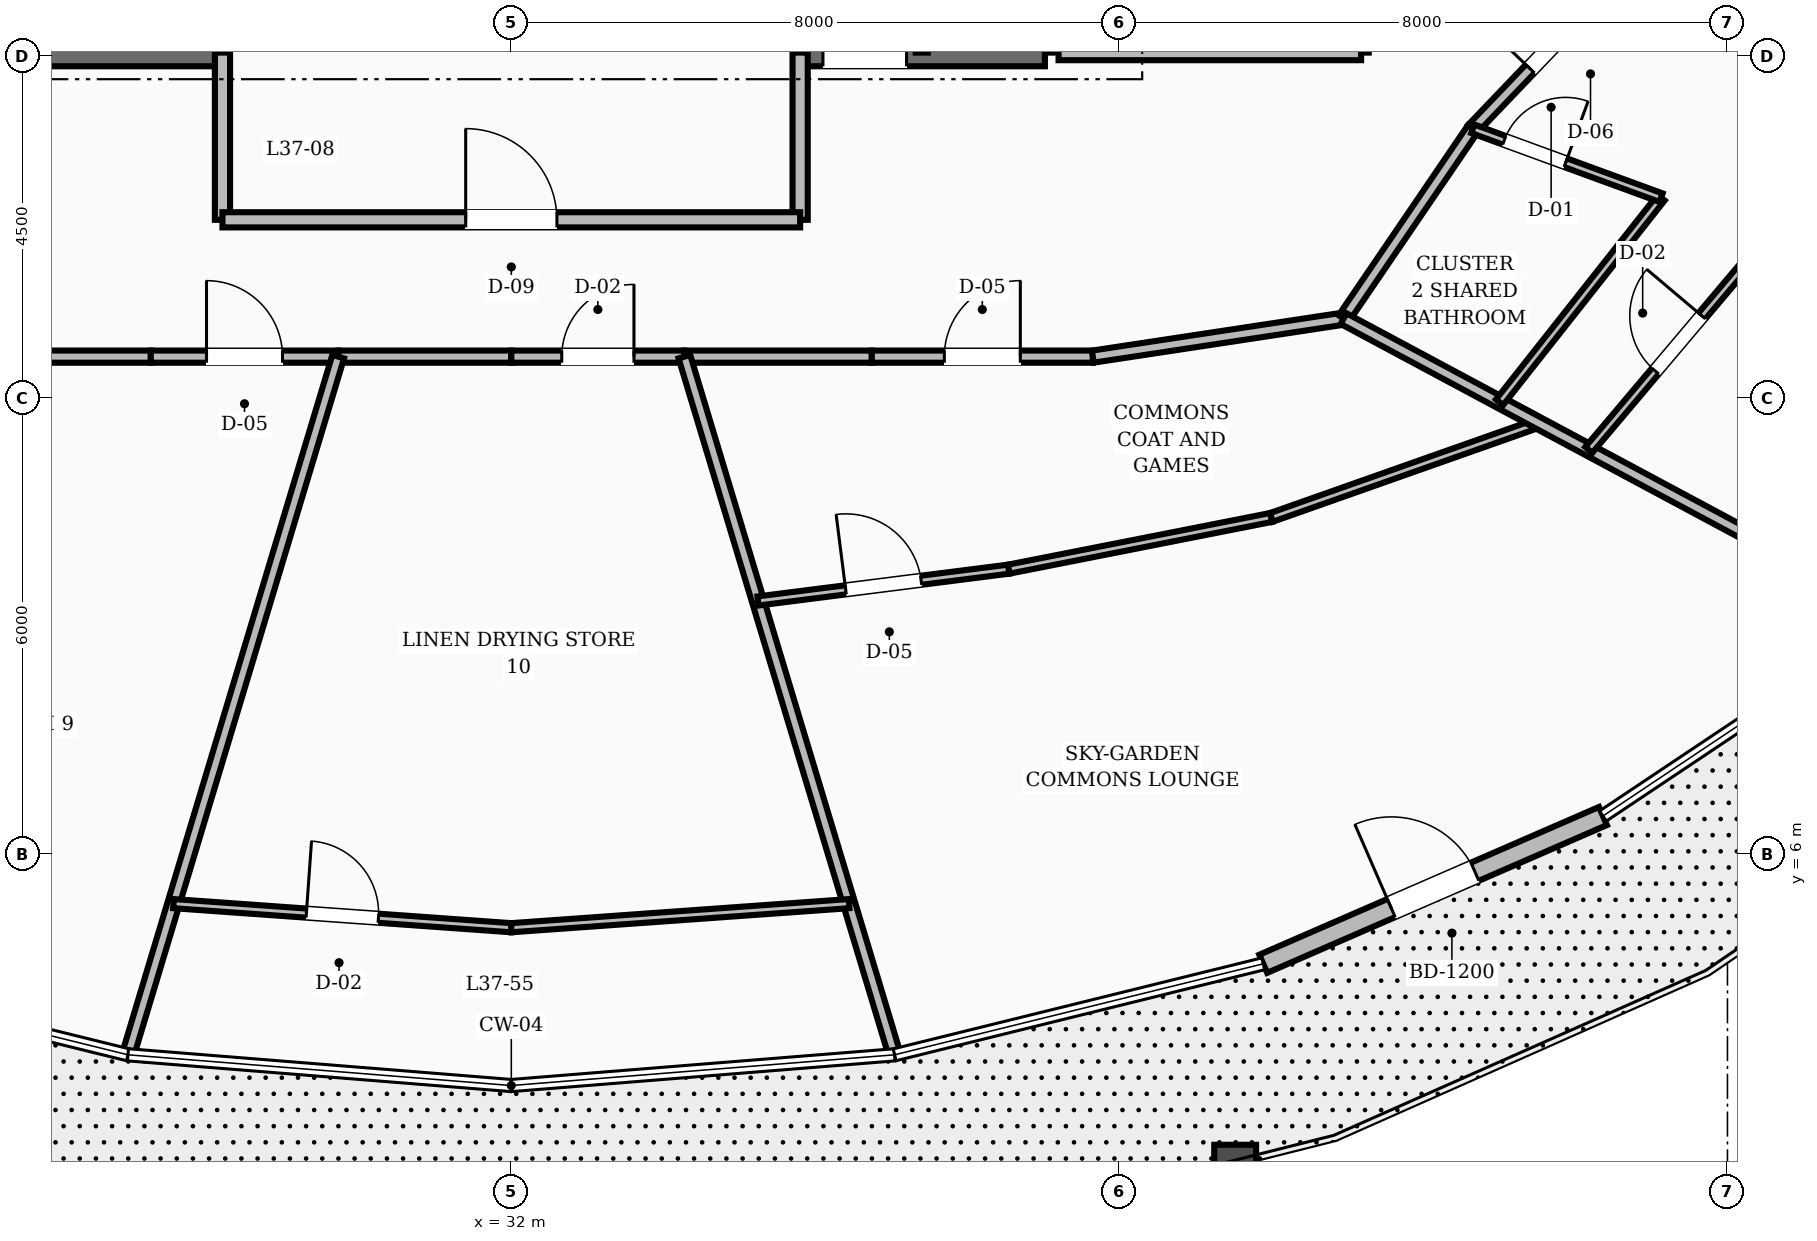
"""IFC4 building model, lengths in metres.
Left out: names, types, materials, properties, quantities, classifications, styles, units other than length and angle.
Written with IfcOpenShell. Run it as: python <this file> out.ifc"""

import sys

from ifc_helpers import new_model, si_unit, direction, frame, frame_2d, origin, place, context, subcontext, project, spatial, rectangle, extrude, element, fill, save


model = new_model("IFC4")
c1 = context("Model", 3, precision=1e-05, world=origin(), true_north=direction((0.0, 1.0)))
c2 = subcontext(c1, "Body", "Model", "MODEL_VIEW")
j1 = project(units=[si_unit("LENGTHUNIT", "METRE"), si_unit("PLANEANGLEUNIT", "RADIAN")], contexts=[c1])
p1 = place(None, origin())
s1 = spatial("IfcSite", under=j1, at=p1, CompositionType="ELEMENT")
p2 = place(p1, origin())
s2 = spatial("IfcBuilding", under=s1, at=p2, CompositionType="ELEMENT")
p3 = place(p2, frame((0.0, 0.0, 146.0)))
s3 = spatial("IfcBuildingStorey", under=s2, at=p3, CompositionType="ELEMENT", Elevation=146.0)
p4 = place(p3, frame((24.98, 16.55, 0.0), z_axis=(0.0, 0.0, 1.0), x_axis=(1.0, 0.0, 0.0)))
e1 = element("IfcWall", 1, at=p4, inside=s3, PredefinedType="SHEAR", context=c2, shape_type="SweptSolid", body=[
    extrude(rectangle(XDim=3.22, YDim=0.36, at=frame_2d((1.61, 0.0))), origin(), (0.0, 0.0, 1.0), 3.6),
])
p5 = place(p3, frame((35.8, 16.55, 0.0), z_axis=(0.0, 0.0, 1.0), x_axis=(1.0, 0.0, 0.0)))
e2 = element("IfcWall", 2, at=p5, inside=s3, PredefinedType="SHEAR", context=c2, shape_type="SweptSolid", body=[
    extrude(rectangle(XDim=3.22, YDim=0.36, at=frame_2d((1.61, 0.0))), origin(), (0.0, 0.0, 1.0), 3.6),
])
p6 = place(p5, frame((0.3, 0.0, 0.0)))
e3 = element("IfcOpeningElement", 3, at=p6, cuts=e2, PredefinedType="OPENING", context=c2, shape_type="SweptSolid", body=[
    extrude(rectangle(XDim=1.1, YDim=2.1, at=frame_2d((0.55, 1.05))), frame((0.0, 0.19, 0.0), z_axis=(0.0, -1.0, 0.0), x_axis=(1.0, 0.0, 0.0)), (0.0, 0.0, 1.0), 0.38),
])
p7 = place(p3, frame((41.893, 4.562, 0.0), z_axis=(0.0, 0.0, 1.0), x_axis=(0.916980839608, 0.398931246948, 0.0)))
e4 = element("IfcWall", 4, at=p7, inside=s3, PredefinedType="STANDARD", context=c2, shape_type="SweptSolid", body=[
    extrude(rectangle(XDim=4.874, YDim=0.26, at=frame_2d((2.437, 0.0))), origin(), (0.0, 0.0, 1.0), 2.82),
])
p8 = place(p7, frame((1.837, 0.0, 0.0)))
e5 = element("IfcOpeningElement", 5, at=p8, cuts=e4, PredefinedType="OPENING", context=c2, shape_type="SweptSolid", body=[
    extrude(rectangle(XDim=1.2, YDim=2.15, at=frame_2d((0.6, 1.075))), frame((0.0, 0.14, 0.0), z_axis=(0.0, -1.0, 0.0), x_axis=(1.0, 0.0, 0.0)), (0.0, 0.0, 1.0), 0.28),
])
p9 = place(p3, frame((39.2, 16.55, 0.0), z_axis=(0.0, 0.0, 1.0), x_axis=(1.0, 0.0, 0.0)))
e6 = element("IfcWall", 6, at=p9, inside=s3, PredefinedType="SOLIDWALL", context=c2, shape_type="SweptSolid", body=[
    extrude(rectangle(XDim=3.98, YDim=0.2, at=frame_2d((1.99, 0.0))), origin(), (0.0, 0.0, 1.0), 2.8),
])
for number, where, z_axis, x_axis in (
    (7, (28.2, 14.35, 0.0), (0.0, 0.0, 1.0), (0.0, 1.0, 0.0)),
    (8, (35.8, 14.35, 0.0), (0.0, 0.0, 1.0), (0.0, 1.0, 0.0)),
):
    element("IfcWall", number, at=place(p3, frame(where, z_axis=z_axis, x_axis=x_axis)), inside=s3, PredefinedType="SOLIDWALL", context=c2, shape_type="SweptSolid", body=[
        extrude(rectangle(XDim=2.2, YDim=0.2, at=frame_2d((1.1, 0.0))), origin(), (0.0, 0.0, 1.0), 2.8),
    ])
p10 = place(p3, frame((28.2, 14.35, 0.0), z_axis=(0.0, 0.0, 1.0), x_axis=(1.0, 0.0, 0.0)))
e9 = element("IfcWall", 9, at=p10, inside=s3, PredefinedType="SOLIDWALL", context=c2, shape_type="SweptSolid", body=[
    extrude(rectangle(XDim=7.6, YDim=0.2, at=frame_2d((3.8, 0.0))), origin(), (0.0, 0.0, 1.0), 2.8),
])
p11 = place(p10, frame((3.2, 0.0, 0.0)))
e10 = element("IfcOpeningElement", 10, at=p11, cuts=e9, PredefinedType="OPENING", context=c2, shape_type="SweptSolid", body=[
    extrude(rectangle(XDim=1.2, YDim=2.1, at=frame_2d((0.6, 1.05))), frame((0.0, 0.11, 0.0), z_axis=(0.0, -1.0, 0.0), x_axis=(1.0, 0.0, 0.0)), (0.0, 0.0, 1.0), 0.22),
])
p12 = place(p3, frame((24.349, 12.55, 0.0), z_axis=(0.0, 0.0, 1.0), x_axis=(1.0, 0.0, 0.0)))
e11 = element("IfcWall", 11, at=p12, inside=s3, PredefinedType="SOLIDWALL", context=c2, shape_type="SweptSolid", body=[
    extrude(rectangle(XDim=2.908, YDim=0.16, at=frame_2d((1.454, 0.0))), origin(), (0.0, 0.0, 1.0), 2.8),
])
p13 = place(p3, frame((27.257, 12.55, 0.0), z_axis=(0.0, 0.0, 1.0), x_axis=(1.0, 0.0, 0.0)))
e12 = element("IfcWall", 12, at=p13, inside=s3, PredefinedType="SOLIDWALL", context=c2, shape_type="SweptSolid", body=[
    extrude(rectangle(XDim=2.465, YDim=0.16, at=frame_2d((1.232, 0.0))), origin(), (0.0, 0.0, 1.0), 2.8),
])
p14 = place(p13, frame((0.733, 0.0, 0.0)))
e13 = element("IfcOpeningElement", 13, at=p14, cuts=e12, PredefinedType="OPENING", context=c2, shape_type="SweptSolid", body=[
    extrude(rectangle(XDim=1.0, YDim=2.1, at=frame_2d((0.5, 1.05))), frame((0.0, 0.09, 0.0), z_axis=(0.0, -1.0, 0.0), x_axis=(1.0, 0.0, 0.0)), (0.0, 0.0, 1.0), 0.18),
])
p15 = place(p3, frame((29.722, 12.55, 0.0), z_axis=(0.0, 0.0, 1.0), x_axis=(1.0, 0.0, 0.0)))
e14 = element("IfcWall", 14, at=p15, inside=s3, PredefinedType="SOLIDWALL", context=c2, shape_type="SweptSolid", body=[
    extrude(rectangle(XDim=2.278, YDim=0.16, at=frame_2d((1.139, 0.0))), origin(), (0.0, 0.0, 1.0), 2.8),
])
p16 = place(p3, frame((32.0, 12.55, 0.0), z_axis=(0.0, 0.0, 1.0), x_axis=(1.0, 0.0, 0.0)))
e15 = element("IfcWall", 15, at=p16, inside=s3, PredefinedType="SOLIDWALL", context=c2, shape_type="SweptSolid", body=[
    extrude(rectangle(XDim=2.278, YDim=0.16, at=frame_2d((1.139, 0.0))), origin(), (0.0, 0.0, 1.0), 2.8),
])
p17 = place(p16, frame((0.664, 0.0, 0.0)))
e16 = element("IfcOpeningElement", 16, at=p17, cuts=e15, PredefinedType="OPENING", context=c2, shape_type="SweptSolid", body=[
    extrude(rectangle(XDim=0.95, YDim=2.1, at=frame_2d((0.475, 1.05))), frame((0.0, 0.09, 0.0), z_axis=(0.0, -1.0, 0.0), x_axis=(1.0, 0.0, 0.0)), (0.0, 0.0, 1.0), 0.18),
])
p18 = place(p3, frame((34.278, 12.55, 0.0), z_axis=(0.0, 0.0, 1.0), x_axis=(1.0, 0.0, 0.0)))
e17 = element("IfcWall", 17, at=p18, inside=s3, PredefinedType="SOLIDWALL", context=c2, shape_type="SweptSolid", body=[
    extrude(rectangle(XDim=2.465, YDim=0.16, at=frame_2d((1.232, 0.0))), origin(), (0.0, 0.0, 1.0), 2.8),
])
p19 = place(p3, frame((36.743, 12.55, 0.0), z_axis=(0.0, 0.0, 1.0), x_axis=(1.0, 0.0, 0.0)))
e18 = element("IfcWall", 18, at=p19, inside=s3, PredefinedType="SOLIDWALL", context=c2, shape_type="SweptSolid", body=[
    extrude(rectangle(XDim=2.908, YDim=0.16, at=frame_2d((1.454, 0.0))), origin(), (0.0, 0.0, 1.0), 2.8),
])
p20 = place(p19, frame((0.954, 0.0, 0.0)))
e19 = element("IfcOpeningElement", 19, at=p20, cuts=e18, PredefinedType="OPENING", context=c2, shape_type="SweptSolid", body=[
    extrude(rectangle(XDim=1.0, YDim=2.1, at=frame_2d((0.5, 1.05))), frame((0.0, 0.09, 0.0), z_axis=(0.0, -1.0, 0.0), x_axis=(1.0, 0.0, 0.0)), (0.0, 0.0, 1.0), 0.18),
])
p21 = place(p3, frame((39.651, 12.55, 0.0), z_axis=(0.0, 0.0, 1.0), x_axis=(0.988710906508, 0.149835721217, 0.0)))
e20 = element("IfcWall", 20, at=p21, inside=s3, PredefinedType="SOLIDWALL", context=c2, shape_type="SweptSolid", body=[
    extrude(rectangle(XDim=3.337, YDim=0.16, at=frame_2d((1.668, 0.0))), origin(), (0.0, 0.0, 1.0), 2.8),
])
p22 = place(p3, frame((42.95, 13.05, 0.0), z_axis=(0.0, 0.0, 1.0), x_axis=(0.562674669208, 0.826678423955, 0.0)))
e21 = element("IfcWall", 21, at=p22, inside=s3, PredefinedType="SOLIDWALL", context=c2, shape_type="SweptSolid", body=[
    extrude(rectangle(XDim=3.021, YDim=0.16, at=frame_2d((1.511, 0.0))), origin(), (0.0, 0.0, 1.0), 2.8),
])
p23 = place(p3, frame((44.65, 15.548, 0.0), z_axis=(0.0, 0.0, 1.0), x_axis=(0.691055487108, 0.722801711216, 0.0)))
e22 = element("IfcWall", 22, at=p23, inside=s3, PredefinedType="SOLIDWALL", context=c2, shape_type="SweptSolid", body=[
    extrude(rectangle(XDim=3.184, YDim=0.16, at=frame_2d((1.592, 0.0))), origin(), (0.0, 0.0, 1.0), 2.8),
])
p24 = place(p23, frame((1.092, 0.0, 0.0)))
e23 = element("IfcOpeningElement", 23, at=p24, cuts=e22, PredefinedType="OPENING", context=c2, shape_type="SweptSolid", body=[
    extrude(rectangle(XDim=1.0, YDim=2.1, at=frame_2d((0.5, 1.05))), frame((0.0, 0.09, 0.0), z_axis=(0.0, -1.0, 0.0), x_axis=(1.0, 0.0, 0.0)), (0.0, 0.0, 1.0), 0.18),
])
p25 = place(p3, frame((34.278, 12.55, 0.0), z_axis=(0.0, 0.0, 1.0), x_axis=(0.28831479655, -0.9575356798, 0.0)))
e24 = element("IfcWall", 24, at=p25, inside=s3, PredefinedType="SOLIDWALL", context=c2, shape_type="SweptSolid", body=[
    extrude(rectangle(XDim=9.542, YDim=0.16, at=frame_2d((4.771, 0.0))), origin(), (0.0, 0.0, 1.0), 2.8),
])
p26 = place(p3, frame((35.246, 9.335, 0.0), z_axis=(0.0, 0.0, 1.0), x_axis=(0.992026301768, 0.126031014438, 0.0)))
e25 = element("IfcWall", 25, at=p26, inside=s3, PredefinedType="PARTITIONING", context=c2, shape_type="SweptSolid", body=[
    extrude(rectangle(XDim=3.326, YDim=0.12, at=frame_2d((1.663, 0.0))), origin(), (0.0, 0.0, 1.0), 2.8),
])
p27 = place(p26, frame((1.163, 0.0, 0.0)))
e26 = element("IfcOpeningElement", 26, at=p27, cuts=e25, PredefinedType="OPENING", context=c2, shape_type="SweptSolid", body=[
    extrude(rectangle(XDim=1.0, YDim=2.1, at=frame_2d((0.5, 1.05))), frame((0.0, 0.07, 0.0), z_axis=(0.0, -1.0, 0.0), x_axis=(1.0, 0.0, 0.0)), (0.0, 0.0, 1.0), 0.14),
])
p28 = place(p3, frame((38.545, 9.754, 0.0), z_axis=(0.0, 0.0, 1.0), x_axis=(0.981147276933, 0.193261535148, 0.0)))
e27 = element("IfcWall", 27, at=p28, inside=s3, PredefinedType="PARTITIONING", context=c2, shape_type="SweptSolid", body=[
    extrude(rectangle(XDim=3.521, YDim=0.12, at=frame_2d((1.76, 0.0))), origin(), (0.0, 0.0, 1.0), 2.8),
])
p29 = place(p3, frame((42.0, 10.435, 0.0), z_axis=(0.0, 0.0, 1.0), x_axis=(0.942997587187, 0.332799565145, 0.0)))
e28 = element("IfcWall", 28, at=p29, inside=s3, PredefinedType="PARTITIONING", context=c2, shape_type="SweptSolid", body=[
    extrude(rectangle(XDim=3.728, YDim=0.12, at=frame_2d((1.864, 0.0))), origin(), (0.0, 0.0, 1.0), 2.8),
])
p30 = place(p3, frame((42.95, 13.05, 0.0), z_axis=(0.0, 0.0, 1.0), x_axis=(0.881439566777, -0.472296824169, 0.0)))
e29 = element("IfcWall", 29, at=p30, inside=s3, PredefinedType="SOLIDWALL", context=c2, shape_type="SweptSolid", body=[
    extrude(rectangle(XDim=8.265, YDim=0.16, at=frame_2d((4.133, 0.0))), origin(), (0.0, 0.0, 1.0), 2.8),
])
p31 = place(p3, frame((45.002, 11.95, 0.0), z_axis=(0.0, 0.0, 1.0), x_axis=(0.619575015098, 0.784937450162, 0.0)))
e30 = element("IfcWall", 30, at=p31, inside=s3, PredefinedType="PARTITIONING", context=c2, shape_type="SweptSolid", body=[
    extrude(rectangle(XDim=3.428, YDim=0.12, at=frame_2d((1.714, 0.0))), origin(), (0.0, 0.0, 1.0), 2.8),
])
p32 = place(p3, frame((44.65, 15.548, 0.0), z_axis=(0.0, 0.0, 1.0), x_axis=(0.93908860173, -0.343675134538, 0.0)))
e31 = element("IfcWall", 31, at=p32, inside=s3, PredefinedType="PARTITIONING", context=c2, shape_type="SweptSolid", body=[
    extrude(rectangle(XDim=2.637, YDim=0.12, at=frame_2d((1.318, 0.0))), origin(), (0.0, 0.0, 1.0), 2.8),
])
p33 = place(p32, frame((0.44, 0.0, 0.0)))
e32 = element("IfcOpeningElement", 32, at=p33, cuts=e31, PredefinedType="OPENING", context=c2, shape_type="SweptSolid", body=[
    extrude(rectangle(XDim=0.86, YDim=2.1, at=frame_2d((0.43, 1.05))), frame((0.0, 0.07, 0.0), z_axis=(0.0, -1.0, 0.0), x_axis=(1.0, 0.0, 0.0)), (0.0, 0.0, 1.0), 0.14),
])
p34 = place(p3, frame((46.175, 11.322, 0.0), z_axis=(0.0, 0.0, 1.0), x_axis=(0.645297395585, 0.763931457169, 0.0)))
e33 = element("IfcWall", 33, at=p34, inside=s3, PredefinedType="PARTITIONING", context=c2, shape_type="SweptSolid", body=[
    extrude(rectangle(XDim=3.667, YDim=0.12, at=frame_2d((1.833, 0.0))), origin(), (0.0, 0.0, 1.0), 2.8),
])
p35 = place(p34, frame((1.359, 0.0, 0.0)))
e34 = element("IfcOpeningElement", 34, at=p35, cuts=e33, PredefinedType="OPENING", context=c2, shape_type="SweptSolid", body=[
    extrude(rectangle(XDim=0.95, YDim=2.1, at=frame_2d((0.475, 1.05))), frame((0.0, 0.07, 0.0), z_axis=(0.0, -1.0, 0.0), x_axis=(1.0, 0.0, 0.0)), (0.0, 0.0, 1.0), 0.14),
])
p36 = place(p3, frame((29.722, 12.55, 0.0), z_axis=(0.0, 0.0, 1.0), x_axis=(-0.28831479655, -0.9575356798, 0.0)))
e35 = element("IfcWall", 35, at=p36, inside=s3, PredefinedType="SOLIDWALL", context=c2, shape_type="SweptSolid", body=[
    extrude(rectangle(XDim=9.542, YDim=0.16, at=frame_2d((4.771, 0.0))), origin(), (0.0, 0.0, 1.0), 2.8),
])
p37 = place(p3, frame((27.556, 5.354, 0.0), z_axis=(0.0, 0.0, 1.0), x_axis=(0.997467592574, -0.071122442055, 0.0)))
e36 = element("IfcWall", 36, at=p37, inside=s3, PredefinedType="PARTITIONING", context=c2, shape_type="SweptSolid", body=[
    extrude(rectangle(XDim=4.456, YDim=0.12, at=frame_2d((2.228, 0.0))), origin(), (0.0, 0.0, 1.0), 2.8),
])
p38 = place(p37, frame((1.753, 0.0, 0.0)))
e37 = element("IfcOpeningElement", 37, at=p38, cuts=e36, PredefinedType="OPENING", context=c2, shape_type="SweptSolid", body=[
    extrude(rectangle(XDim=0.95, YDim=2.1, at=frame_2d((0.475, 1.05))), frame((0.0, 0.07, 0.0), z_axis=(0.0, -1.0, 0.0), x_axis=(1.0, 0.0, 0.0)), (0.0, 0.0, 1.0), 0.14),
])
p39 = place(p3, frame((32.0, 5.037, 0.0), z_axis=(0.0, 0.0, 1.0), x_axis=(0.997467592574, 0.071122442055, 0.0)))
e38 = element("IfcWall", 38, at=p39, inside=s3, PredefinedType="PARTITIONING", context=c2, shape_type="SweptSolid", body=[
    extrude(rectangle(XDim=4.456, YDim=0.12, at=frame_2d((2.228, 0.0))), origin(), (0.0, 0.0, 1.0), 2.8),
])
p40 = place(p8, origin())
e39 = element("IfcDoor", 39, at=p40, inside=s3, OperationType="SINGLE_SWING_LEFT", PredefinedType="DOOR", context=c2, shape_type="SweptSolid", body=[
    extrude(rectangle(XDim=1.2, YDim=2.15, at=frame_2d((0.6, 1.075))), frame((0.0, 0.025, 0.0), z_axis=(0.0, -1.0, 0.0), x_axis=(1.0, 0.0, 0.0)), (0.0, 0.0, 1.0), 0.05),
])
fill(e5, e39)
p41 = place(p6, origin())
e40 = element("IfcDoor", 40, at=p41, inside=s3, OperationType="SINGLE_SWING_RIGHT", PredefinedType="DOOR", context=c2, shape_type="SweptSolid", body=[
    extrude(rectangle(XDim=1.1, YDim=2.1, at=frame_2d((0.55, 1.05))), frame((0.0, 0.025, 0.0), z_axis=(0.0, -1.0, 0.0), x_axis=(1.0, 0.0, 0.0)), (0.0, 0.0, 1.0), 0.05),
])
fill(e3, e40)
p42 = place(p11, origin())
e41 = element("IfcDoor", 41, at=p42, inside=s3, OperationType="SINGLE_SWING_LEFT", PredefinedType="DOOR", context=c2, shape_type="SweptSolid", body=[
    extrude(rectangle(XDim=1.2, YDim=2.1, at=frame_2d((0.6, 1.05))), frame((0.0, 0.025, 0.0), z_axis=(0.0, -1.0, 0.0), x_axis=(1.0, 0.0, 0.0)), (0.0, 0.0, 1.0), 0.05),
])
fill(e10, e41)
p43 = place(p20, origin())
e42 = element("IfcDoor", 42, at=p43, inside=s3, OperationType="SINGLE_SWING_RIGHT", PredefinedType="DOOR", context=c2, shape_type="SweptSolid", body=[
    extrude(rectangle(XDim=1.0, YDim=2.1, at=frame_2d((0.5, 1.05))), frame((0.0, 0.025, 0.0), z_axis=(0.0, -1.0, 0.0), x_axis=(1.0, 0.0, 0.0)), (0.0, 0.0, 1.0), 0.05),
])
fill(e19, e42)
p44 = place(p27, origin())
e43 = element("IfcDoor", 43, at=p44, inside=s3, OperationType="SINGLE_SWING_LEFT", PredefinedType="DOOR", context=c2, shape_type="SweptSolid", body=[
    extrude(rectangle(XDim=1.0, YDim=2.1, at=frame_2d((0.5, 1.05))), frame((0.0, 0.025, 0.0), z_axis=(0.0, -1.0, 0.0), x_axis=(1.0, 0.0, 0.0)), (0.0, 0.0, 1.0), 0.05),
])
fill(e26, e43)
p45 = place(p33, origin())
e44 = element("IfcDoor", 44, at=p45, inside=s3, OperationType="SINGLE_SWING_RIGHT", PredefinedType="DOOR", context=c2, shape_type="SweptSolid", body=[
    extrude(rectangle(XDim=0.86, YDim=2.1, at=frame_2d((0.43, 1.05))), frame((0.0, 0.025, 0.0), z_axis=(0.0, -1.0, 0.0), x_axis=(1.0, 0.0, 0.0)), (0.0, 0.0, 1.0), 0.05),
])
fill(e32, e44)
p46 = place(p24, origin())
e45 = element("IfcDoor", 45, at=p46, inside=s3, OperationType="SINGLE_SWING_LEFT", PredefinedType="DOOR", context=c2, shape_type="SweptSolid", body=[
    extrude(rectangle(XDim=1.0, YDim=2.1, at=frame_2d((0.5, 1.05))), frame((0.0, 0.025, 0.0), z_axis=(0.0, -1.0, 0.0), x_axis=(1.0, 0.0, 0.0)), (0.0, 0.0, 1.0), 0.05),
])
fill(e23, e45)
p47 = place(p35, origin())
e46 = element("IfcDoor", 46, at=p47, inside=s3, OperationType="SINGLE_SWING_RIGHT", PredefinedType="DOOR", context=c2, shape_type="SweptSolid", body=[
    extrude(rectangle(XDim=0.95, YDim=2.1, at=frame_2d((0.475, 1.05))), frame((0.0, 0.025, 0.0), z_axis=(0.0, -1.0, 0.0), x_axis=(1.0, 0.0, 0.0)), (0.0, 0.0, 1.0), 0.05),
])
fill(e34, e46)
p48 = place(p14, origin())
e47 = element("IfcDoor", 47, at=p48, inside=s3, OperationType="SINGLE_SWING_LEFT", PredefinedType="DOOR", context=c2, shape_type="SweptSolid", body=[
    extrude(rectangle(XDim=1.0, YDim=2.1, at=frame_2d((0.5, 1.05))), frame((0.0, 0.025, 0.0), z_axis=(0.0, -1.0, 0.0), x_axis=(1.0, 0.0, 0.0)), (0.0, 0.0, 1.0), 0.05),
])
fill(e13, e47)
p49 = place(p17, origin())
e48 = element("IfcDoor", 48, at=p49, inside=s3, OperationType="SINGLE_SWING_RIGHT", PredefinedType="DOOR", context=c2, shape_type="SweptSolid", body=[
    extrude(rectangle(XDim=0.95, YDim=2.1, at=frame_2d((0.475, 1.05))), frame((0.0, 0.025, 0.0), z_axis=(0.0, -1.0, 0.0), x_axis=(1.0, 0.0, 0.0)), (0.0, 0.0, 1.0), 0.05),
])
fill(e16, e48)
p50 = place(p38, origin())
e49 = element("IfcDoor", 49, at=p50, inside=s3, OperationType="SINGLE_SWING_LEFT", PredefinedType="DOOR", context=c2, shape_type="SweptSolid", body=[
    extrude(rectangle(XDim=0.95, YDim=2.1, at=frame_2d((0.475, 1.05))), frame((0.0, 0.025, 0.0), z_axis=(0.0, -1.0, 0.0), x_axis=(1.0, 0.0, 0.0)), (0.0, 0.0, 1.0), 0.05),
])
fill(e37, e49)
save(model, sys.argv[1])
